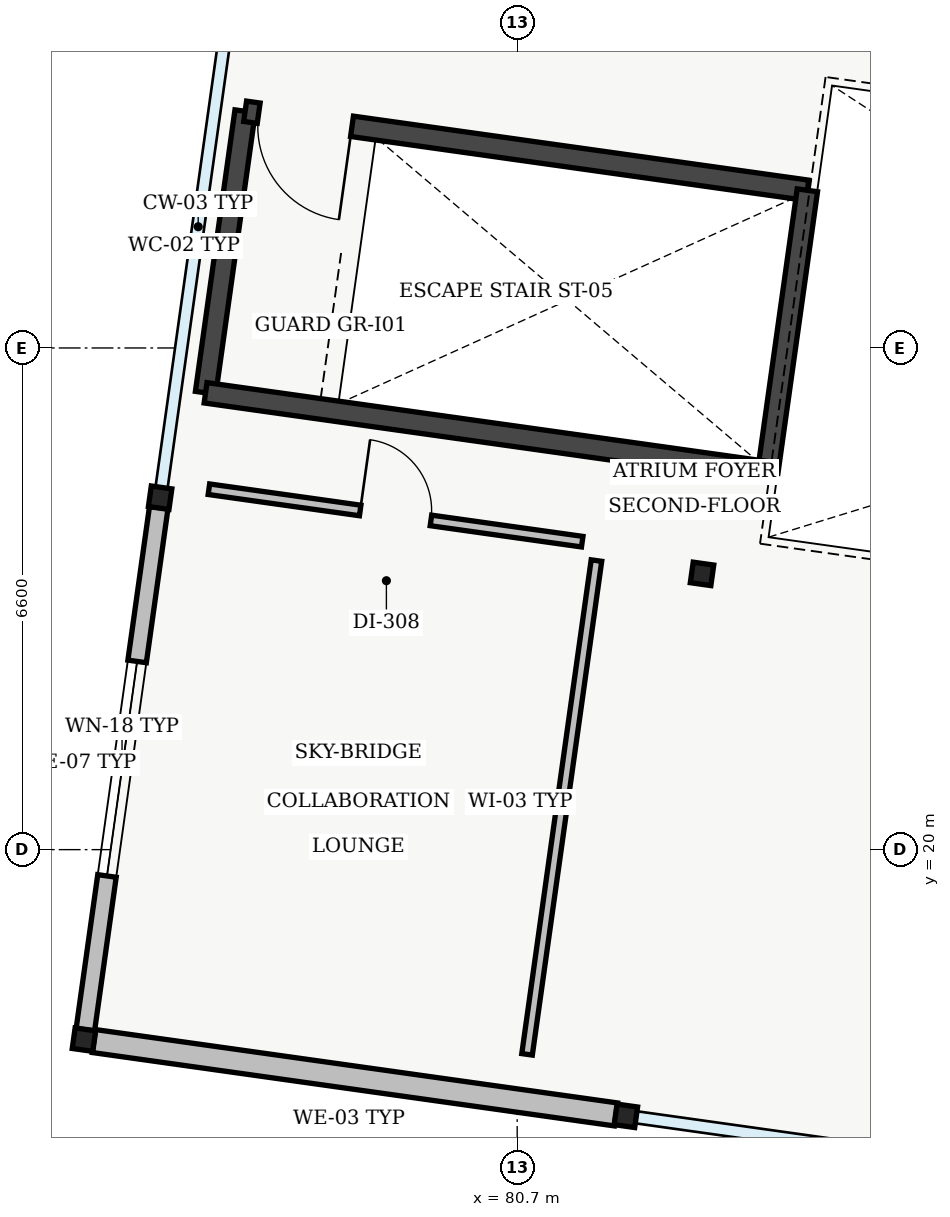
"""IFC4 building model, lengths in metres.
Left out: names, types, materials, properties, quantities, classifications, styles, units other than length and angle.
Written with IfcOpenShell. Run it as: python <this file> out.ifc"""

import sys

from ifc_helpers import new_model, si_unit, direction, frame, frame_2d, origin, origin_2d, place, context, subcontext, project, spatial, rectangle, hollow_circle, extrude, element, fill, save


model = new_model("IFC4")
c1 = context("Model", 3, precision=1e-05, world=origin(), true_north=direction((0.0, 1.0)))
c2 = subcontext(c1, "Body", "Model", "MODEL_VIEW")
j1 = project(units=[si_unit("LENGTHUNIT", "METRE"), si_unit("PLANEANGLEUNIT", "RADIAN")], contexts=[c1])
p1 = place(None, origin())
s1 = spatial("IfcSite", under=j1, at=p1, CompositionType="ELEMENT")
p2 = place(p1, origin())
s2 = spatial("IfcBuilding", under=s1, at=p2, CompositionType="ELEMENT")
p3 = place(p2, frame((0.0, 0.0, 9.6)))
s3 = spatial("IfcBuildingStorey", under=s2, at=p3, CompositionType="ELEMENT", Elevation=9.6)
for number, where, z_axis, x_axis in (
    (1, (75.0, 17.5, 0.0), (0.0, 0.0, 1.0), (0.99, -0.139, 0.0)),
    (2, (76.002, 24.63, 0.0), (0.0, 0.0, 1.0), (0.99, -0.139, 0.0)),
    (3, (82.13, 16.498, 0.0), (0.0, 0.0, 1.0), (0.99, -0.139, 0.0)),
    (4, (83.132, 23.628, 0.0), (0.0, 0.0, 1.0), (0.99, -0.139, 0.0)),
):
    element("IfcColumn", number, at=place(p3, frame(where, z_axis=z_axis, x_axis=x_axis)), inside=s3, PredefinedType="COLUMN", context=c2, shape_type="SweptSolid", body=[
        extrude(hollow_circle(Radius=0.136, WallThickness=0.01, at=origin_2d()), origin(), (0.0, 0.0, 1.0), 4.325),
    ])
p4 = place(p3, frame((75.018, 17.63, 0.0), z_axis=(0.0, 0.0, 1.0), x_axis=(0.139154533409, 0.990270678063, 0.0)))
e5 = element("IfcWall", 5, at=p4, inside=s3, PredefinedType="STANDARD", context=c2, shape_type="SweptSolid", body=[
    extrude(rectangle(XDim=6.937, YDim=0.245, at=frame_2d((3.469, 0.0))), origin(), (0.0, 0.0, 1.0), 4.09),
])
p5 = place(p4, frame((2.043, 0.0, 0.95)))
e6 = element("IfcOpeningElement", 6, at=p5, cuts=e5, PredefinedType="OPENING", context=c2, shape_type="SweptSolid", body=[
    extrude(rectangle(XDim=2.85, YDim=1.5, at=frame_2d((1.425, 0.75))), frame((0.0, 0.123, 0.0), z_axis=(0.0, -1.0, 0.0), x_axis=(1.0, 0.0, 0.0)), (0.0, 0.0, 1.0), 0.245),
])
p6 = place(p3, frame((82.0, 16.516, 0.0), z_axis=(0.0, 0.0, 1.0), x_axis=(-0.990270678063, 0.139154533409, 0.0)))
e7 = element("IfcWall", 7, at=p6, inside=s3, PredefinedType="STANDARD", context=c2, shape_type="SweptSolid", body=[
    extrude(rectangle(XDim=6.937, YDim=0.305, at=frame_2d((3.469, 0.0))), origin(), (0.0, 0.0, 1.0), 4.09),
])
p7 = place(p3, frame((76.6, 26.01, 0.0), z_axis=(0.0, 0.0, 1.0), x_axis=(0.139172815303, 0.990268108888, 0.0)))
e8 = element("IfcWall", 8, at=p7, inside=s3, PredefinedType="SHEAR", context=c2, shape_type="SweptSolid", body=[
    extrude(rectangle(XDim=3.74, YDim=0.27, at=frame_2d((1.87, 0.0))), origin(), (0.0, 0.0, 1.0), 4.25),
])
p8 = place(p3, frame((77.12, 29.714, 0.0), z_axis=(0.0, 0.0, 1.0), x_axis=(0.990265308789, -0.139192737628, 0.0)))
e9 = element("IfcWall", 9, at=p8, inside=s3, PredefinedType="SHEAR", context=c2, shape_type="SweptSolid", body=[
    extrude(rectangle(XDim=7.47, YDim=0.27, at=frame_2d((3.735, 0.0))), origin(), (0.0, 0.0, 1.0), 4.25),
])
p9 = place(p8, frame((0.18, 0.0, 0.0)))
e10 = element("IfcOpeningElement", 10, at=p9, cuts=e9, PredefinedType="OPENING", context=c2, shape_type="SweptSolid", body=[
    extrude(rectangle(XDim=1.24, YDim=2.15, at=frame_2d((0.62, 1.075))), frame((0.0, 0.135, 0.0), z_axis=(0.0, -1.0, 0.0), x_axis=(1.0, 0.0, 0.0)), (0.0, 0.0, 1.0), 0.27),
])
p10 = place(p3, frame((84.518, 28.674, 0.0), z_axis=(0.0, 0.0, 1.0), x_axis=(-0.139172815303, -0.990268108888, 0.0)))
e11 = element("IfcWall", 11, at=p10, inside=s3, PredefinedType="SHEAR", context=c2, shape_type="SweptSolid", body=[
    extrude(rectangle(XDim=3.74, YDim=0.27, at=frame_2d((1.87, 0.0))), origin(), (0.0, 0.0, 1.0), 4.25),
])
p11 = place(p3, frame((83.997, 24.97, 0.0), z_axis=(0.0, 0.0, 1.0), x_axis=(-0.990265308789, 0.139192737628, 0.0)))
e12 = element("IfcWall", 12, at=p11, inside=s3, PredefinedType="SHEAR", context=c2, shape_type="SweptSolid", body=[
    extrude(rectangle(XDim=7.47, YDim=0.27, at=frame_2d((3.735, 0.0))), origin(), (0.0, 0.0, 1.0), 4.25),
])
p12 = place(p3, frame((80.83, 17.307, 0.0), z_axis=(0.0, 0.0, 1.0), x_axis=(0.139185834999, 0.990266279006, 0.0)))
e13 = element("IfcWall", 13, at=p12, inside=s3, PredefinedType="PARTITIONING", context=c2, shape_type="SweptSolid", body=[
    extrude(rectangle(XDim=6.56, YDim=0.14, at=frame_2d((3.28, 0.0))), origin(), (0.0, 0.0, 1.0), 3.95),
])
p13 = place(p3, frame((81.556, 24.052, 0.0), z_axis=(0.0, 0.0, 1.0), x_axis=(-0.990271738652, 0.139146985694, 0.0)))
e14 = element("IfcWall", 14, at=p13, inside=s3, PredefinedType="PARTITIONING", context=c2, shape_type="SweptSolid", body=[
    extrude(rectangle(XDim=4.96, YDim=0.14, at=frame_2d((2.48, 0.0))), origin(), (0.0, 0.0, 1.0), 3.95),
])
p14 = place(p13, frame((2.01, 0.0, 0.0)))
e15 = element("IfcOpeningElement", 15, at=p14, cuts=e14, PredefinedType="OPENING", context=c2, shape_type="SweptSolid", body=[
    extrude(rectangle(XDim=0.94, YDim=2.12, at=frame_2d((0.47, 1.06))), frame((0.0, 0.07, 0.0), z_axis=(0.0, -1.0, 0.0), x_axis=(1.0, 0.0, 0.0)), (0.0, 0.0, 1.0), 0.14),
])
p15 = place(p5, origin())
e16 = element("IfcWindow", 16, at=p15, inside=s3, PartitioningType="SINGLE_PANEL", PredefinedType="WINDOW", context=c2, shape_type="SweptSolid", body=[
    extrude(rectangle(XDim=2.85, YDim=1.5, at=frame_2d((1.425, 0.75))), frame((0.0, 0.03, 0.0), z_axis=(0.0, -1.0, 0.0), x_axis=(1.0, 0.0, 0.0)), (0.0, 0.0, 1.0), 0.06),
])
fill(e6, e16)
p16 = place(p9, origin())
e17 = element("IfcDoor", 17, at=p16, inside=s3, OperationType="SINGLE_SWING_RIGHT", PredefinedType="DOOR", context=c2, shape_type="SweptSolid", body=[
    extrude(rectangle(XDim=1.24, YDim=2.15, at=frame_2d((0.62, 1.075))), frame((0.0, 0.025, 0.0), z_axis=(0.0, -1.0, 0.0), x_axis=(1.0, 0.0, 0.0)), (0.0, 0.0, 1.0), 0.05),
])
fill(e10, e17)
p17 = place(p14, origin())
e18 = element("IfcDoor", 18, at=p17, inside=s3, OperationType="SINGLE_SWING_RIGHT", PredefinedType="DOOR", context=c2, shape_type="SweptSolid", body=[
    extrude(rectangle(XDim=0.94, YDim=2.12, at=frame_2d((0.47, 1.06))), frame((0.0, 0.025, 0.0), z_axis=(0.0, -1.0, 0.0), x_axis=(1.0, 0.0, 0.0)), (0.0, 0.0, 1.0), 0.05),
])
fill(e15, e18)
save(model, sys.argv[1])
